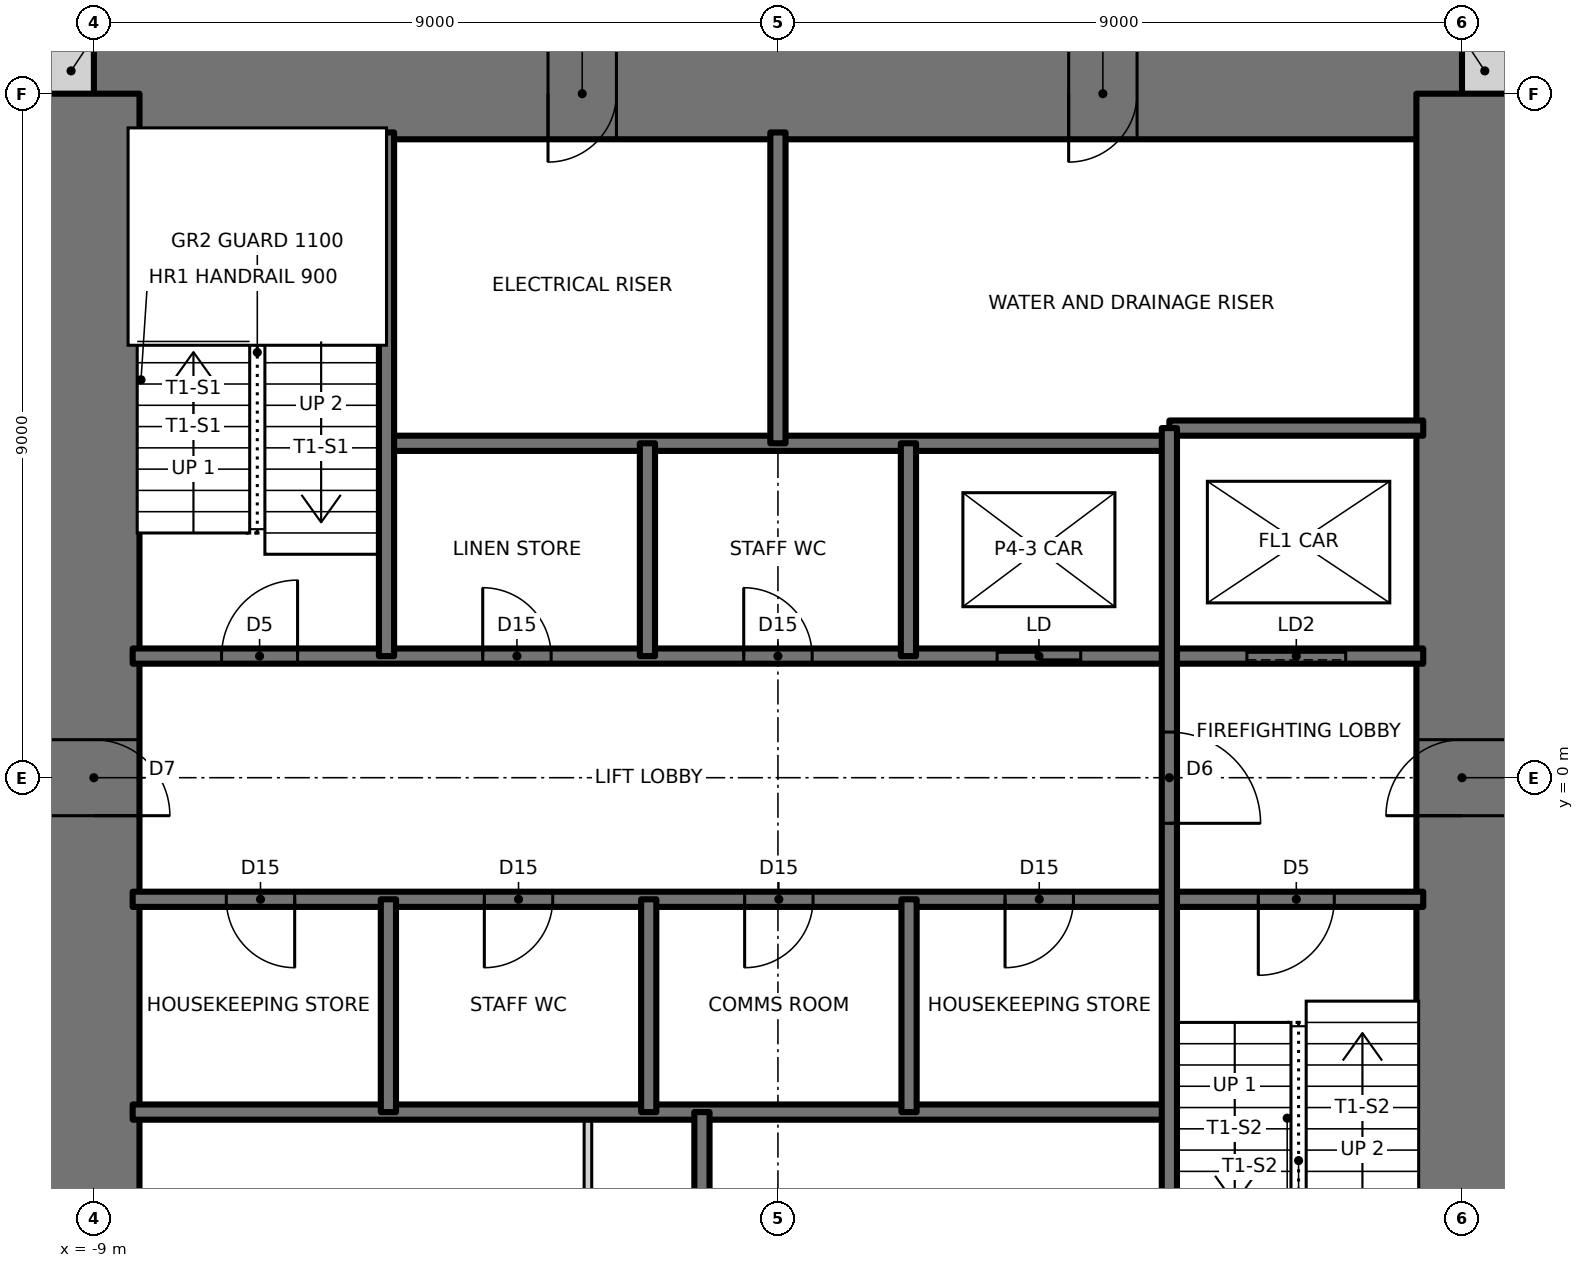
"""IFC4 building model, lengths in metres.
Left out: names, types, materials, properties, quantities, classifications, styles, units other than length and angle.
Written with IfcOpenShell. Run it as: python <this file> out.ifc"""

import sys

from ifc_helpers import new_model, si_unit, direction, frame, frame_2d, origin, place, context, subcontext, project, spatial, rectangle, extrude, element, fill, save


model = new_model("IFC4")
c1 = context("Model", 3, precision=1e-05, world=origin(), true_north=direction((0.0, 1.0)))
c2 = subcontext(c1, "Body", "Model", "MODEL_VIEW")
j1 = project(units=[si_unit("LENGTHUNIT", "METRE"), si_unit("PLANEANGLEUNIT", "RADIAN")], contexts=[c1])
p1 = place(None, origin())
s1 = spatial("IfcSite", under=j1, at=p1, CompositionType="ELEMENT")
p2 = place(p1, origin())
s2 = spatial("IfcBuilding", under=s1, at=p2, CompositionType="ELEMENT")
p3 = place(p2, frame((0.0, 0.0, 264.0)))
s3 = spatial("IfcBuildingStorey", under=s2, at=p3, CompositionType="ELEMENT", Elevation=264.0)
for number, where, z_axis, x_axis in (
    (1, (9.0, 9.3, 0.0), (0.0, 0.0, 1.0), (1.0, 0.0, 0.0)),
    (2, (-9.6, 9.3, 0.0), (0.0, 0.0, 1.0), (1.0, 0.0, 0.0)),
):
    element("IfcWall", number, at=place(p3, frame(where, z_axis=z_axis, x_axis=x_axis)), inside=s3, PredefinedType="SOLIDWALL", context=c2, shape_type="SweptSolid", body=[
        extrude(rectangle(XDim=0.6, YDim=0.6, at=frame_2d((0.3, 0.0))), origin(), (0.0, 0.0, 1.0), 3.5),
    ])
p4 = place(p3, frame((9.0, 9.0, 0.0), z_axis=(0.0, 0.0, 1.0), x_axis=(-1.0, 0.0, 0.0)))
e3 = element("IfcWall", 3, at=p4, inside=s3, PredefinedType="SHEAR", context=c2, shape_type="SweptSolid", body=[
    extrude(rectangle(XDim=18.0, YDim=1.2, at=frame_2d((9.0, 0.0))), origin(), (0.0, 0.0, 1.0), 3.5),
])
p5 = place(p4, frame((11.125, 0.0, 0.0)))
e4 = element("IfcOpeningElement", 4, at=p5, cuts=e3, PredefinedType="OPENING", context=c2, shape_type="SweptSolid", body=[
    extrude(rectangle(XDim=0.9, YDim=2.1, at=frame_2d((0.45, 1.05))), frame((0.0, 0.61, 0.0), z_axis=(0.0, -1.0, 0.0), x_axis=(1.0, 0.0, 0.0)), (0.0, 0.0, 1.0), 1.22),
])
p6 = place(p4, frame((4.275, 0.0, 0.0)))
e5 = element("IfcOpeningElement", 5, at=p6, cuts=e3, PredefinedType="OPENING", context=c2, shape_type="SweptSolid", body=[
    extrude(rectangle(XDim=0.9, YDim=2.1, at=frame_2d((0.45, 1.05))), frame((0.0, 0.61, 0.0), z_axis=(0.0, -1.0, 0.0), x_axis=(1.0, 0.0, 0.0)), (0.0, 0.0, 1.0), 1.22),
])
p7 = place(p3, frame((9.0, -9.0, 0.0), z_axis=(0.0, 0.0, 1.0), x_axis=(0.0, 1.0, 0.0)))
e6 = element("IfcWall", 6, at=p7, inside=s3, PredefinedType="SHEAR", context=c2, shape_type="SweptSolid", body=[
    extrude(rectangle(XDim=18.0, YDim=1.2, at=frame_2d((9.0, 0.0))), origin(), (0.0, 0.0, 1.0), 3.5),
])
p8 = place(p7, frame((8.5, 0.0, 0.0)))
e7 = element("IfcOpeningElement", 7, at=p8, cuts=e6, PredefinedType="OPENING", context=c2, shape_type="SweptSolid", body=[
    extrude(rectangle(XDim=1.0, YDim=2.1, at=frame_2d((0.5, 1.05))), frame((0.0, 0.61, 0.0), z_axis=(0.0, -1.0, 0.0), x_axis=(1.0, 0.0, 0.0)), (0.0, 0.0, 1.0), 1.22),
])
p9 = place(p3, frame((-9.0, 9.0, 0.0), z_axis=(0.0, 0.0, 1.0), x_axis=(0.0, -1.0, 0.0)))
e8 = element("IfcWall", 8, at=p9, inside=s3, PredefinedType="SHEAR", context=c2, shape_type="SweptSolid", body=[
    extrude(rectangle(XDim=18.0, YDim=1.2, at=frame_2d((9.0, 0.0))), origin(), (0.0, 0.0, 1.0), 3.5),
])
p10 = place(p9, frame((8.5, 0.0, 0.0)))
e9 = element("IfcOpeningElement", 9, at=p10, cuts=e8, PredefinedType="OPENING", context=c2, shape_type="SweptSolid", body=[
    extrude(rectangle(XDim=1.0, YDim=2.1, at=frame_2d((0.5, 1.05))), frame((0.0, 0.61, 0.0), z_axis=(0.0, -1.0, 0.0), x_axis=(1.0, 0.0, 0.0)), (0.0, 0.0, 1.0), 1.22),
])
p11 = place(p3, frame((-8.49, -4.4, 0.0), z_axis=(0.0, 0.0, 1.0), x_axis=(1.0, 0.0, 0.0)))
e10 = element("IfcWall", 10, at=p11, inside=s3, PredefinedType="SOLIDWALL", context=c2, shape_type="SweptSolid", body=[
    extrude(rectangle(XDim=13.64, YDim=0.2, at=frame_2d((6.82, 0.0))), origin(), (0.0, 0.0, 1.0), 3.5),
])
p12 = place(p3, frame((-8.49, -1.6, 0.0), z_axis=(0.0, 0.0, 1.0), x_axis=(1.0, 0.0, 0.0)))
e11 = element("IfcWall", 11, at=p12, inside=s3, PredefinedType="SOLIDWALL", context=c2, shape_type="SweptSolid", body=[
    extrude(rectangle(XDim=16.98, YDim=0.2, at=frame_2d((8.49, 0.0))), origin(), (0.0, 0.0, 1.0), 3.5),
])
p13 = place(p12, frame((14.81, 0.0, 0.0)))
e12 = element("IfcOpeningElement", 12, at=p13, cuts=e11, PredefinedType="OPENING", context=c2, shape_type="SweptSolid", body=[
    extrude(rectangle(XDim=1.0, YDim=2.1, at=frame_2d((0.5, 1.05))), frame((0.0, 0.11, 0.0), z_axis=(0.0, -1.0, 0.0), x_axis=(1.0, 0.0, 0.0)), (0.0, 0.0, 1.0), 0.22),
])
p14 = place(p12, frame((1.232, 0.0, 0.0)))
e13 = element("IfcOpeningElement", 13, at=p14, cuts=e11, PredefinedType="OPENING", context=c2, shape_type="SweptSolid", body=[
    extrude(rectangle(XDim=0.9, YDim=2.1, at=frame_2d((0.45, 1.05))), frame((0.0, 0.11, 0.0), z_axis=(0.0, -1.0, 0.0), x_axis=(1.0, 0.0, 0.0)), (0.0, 0.0, 1.0), 0.22),
])
p15 = place(p12, frame((4.627, 0.0, 0.0)))
e14 = element("IfcOpeningElement", 14, at=p15, cuts=e11, PredefinedType="OPENING", context=c2, shape_type="SweptSolid", body=[
    extrude(rectangle(XDim=0.9, YDim=2.1, at=frame_2d((0.45, 1.05))), frame((0.0, 0.11, 0.0), z_axis=(0.0, -1.0, 0.0), x_axis=(1.0, 0.0, 0.0)), (0.0, 0.0, 1.0), 0.22),
])
p16 = place(p12, frame((8.052, 0.0, 0.0)))
e15 = element("IfcOpeningElement", 15, at=p16, cuts=e11, PredefinedType="OPENING", context=c2, shape_type="SweptSolid", body=[
    extrude(rectangle(XDim=0.9, YDim=2.1, at=frame_2d((0.45, 1.05))), frame((0.0, 0.11, 0.0), z_axis=(0.0, -1.0, 0.0), x_axis=(1.0, 0.0, 0.0)), (0.0, 0.0, 1.0), 0.22),
])
p17 = place(p12, frame((11.478, 0.0, 0.0)))
e16 = element("IfcOpeningElement", 16, at=p17, cuts=e11, PredefinedType="OPENING", context=c2, shape_type="SweptSolid", body=[
    extrude(rectangle(XDim=0.9, YDim=2.1, at=frame_2d((0.45, 1.05))), frame((0.0, 0.11, 0.0), z_axis=(0.0, -1.0, 0.0), x_axis=(1.0, 0.0, 0.0)), (0.0, 0.0, 1.0), 0.22),
])
p18 = place(p3, frame((-8.49, 1.6, 0.0), z_axis=(0.0, 0.0, 1.0), x_axis=(1.0, 0.0, 0.0)))
e17 = element("IfcWall", 17, at=p18, inside=s3, PredefinedType="SOLIDWALL", context=c2, shape_type="SweptSolid", body=[
    extrude(rectangle(XDim=16.98, YDim=0.2, at=frame_2d((8.49, 0.0))), origin(), (0.0, 0.0, 1.0), 3.5),
])
p19 = place(p18, frame((1.17, 0.0, 0.0)))
e18 = element("IfcOpeningElement", 18, at=p19, cuts=e17, PredefinedType="OPENING", context=c2, shape_type="SweptSolid", body=[
    extrude(rectangle(XDim=1.0, YDim=2.1, at=frame_2d((0.5, 1.05))), frame((0.0, 0.11, 0.0), z_axis=(0.0, -1.0, 0.0), x_axis=(1.0, 0.0, 0.0)), (0.0, 0.0, 1.0), 0.22),
])
p20 = place(p18, frame((4.606, 0.0, 0.0)))
e19 = element("IfcOpeningElement", 19, at=p20, cuts=e17, PredefinedType="OPENING", context=c2, shape_type="SweptSolid", body=[
    extrude(rectangle(XDim=0.9, YDim=2.1, at=frame_2d((0.45, 1.05))), frame((0.0, 0.11, 0.0), z_axis=(0.0, -1.0, 0.0), x_axis=(1.0, 0.0, 0.0)), (0.0, 0.0, 1.0), 0.22),
])
p21 = place(p18, frame((8.04, 0.0, 0.0)))
e20 = element("IfcOpeningElement", 20, at=p21, cuts=e17, PredefinedType="OPENING", context=c2, shape_type="SweptSolid", body=[
    extrude(rectangle(XDim=0.9, YDim=2.1, at=frame_2d((0.45, 1.05))), frame((0.0, 0.11, 0.0), z_axis=(0.0, -1.0, 0.0), x_axis=(1.0, 0.0, 0.0)), (0.0, 0.0, 1.0), 0.22),
])
p22 = place(p18, frame((11.374, 0.0, 0.0)))
e21 = element("IfcOpeningElement", 21, at=p22, cuts=e17, PredefinedType="OPENING", context=c2, shape_type="SweptSolid", body=[
    extrude(rectangle(XDim=1.1, YDim=2.1, at=frame_2d((0.55, 1.05))), frame((0.0, 0.11, 0.0), z_axis=(0.0, -1.0, 0.0), x_axis=(1.0, 0.0, 0.0)), (0.0, 0.0, 1.0), 0.22),
])
p23 = place(p18, frame((14.66, 0.0, 0.0)))
e22 = element("IfcOpeningElement", 22, at=p23, cuts=e17, PredefinedType="OPENING", context=c2, shape_type="SweptSolid", body=[
    extrude(rectangle(XDim=1.3, YDim=2.1, at=frame_2d((0.65, 1.05))), frame((0.0, 0.11, 0.0), z_axis=(0.0, -1.0, 0.0), x_axis=(1.0, 0.0, 0.0)), (0.0, 0.0, 1.0), 0.22),
])
p24 = place(p3, frame((-5.15, 4.4, 0.0), z_axis=(0.0, 0.0, 1.0), x_axis=(1.0, 0.0, 0.0)))
e23 = element("IfcWall", 23, at=p24, inside=s3, PredefinedType="SOLIDWALL", context=c2, shape_type="SweptSolid", body=[
    extrude(rectangle(XDim=10.3, YDim=0.2, at=frame_2d((5.15, 0.0))), origin(), (0.0, 0.0, 1.0), 3.5),
])
p25 = place(p3, frame((5.15, 4.6, 0.0), z_axis=(0.0, 0.0, 1.0), x_axis=(1.0, 0.0, 0.0)))
e24 = element("IfcWall", 24, at=p25, inside=s3, PredefinedType="SOLIDWALL", context=c2, shape_type="SweptSolid", body=[
    extrude(rectangle(XDim=3.34, YDim=0.2, at=frame_2d((1.67, 0.0))), origin(), (0.0, 0.0, 1.0), 3.5),
])
p26 = place(p3, frame((5.15, -8.49, 0.0), z_axis=(0.0, 0.0, 1.0), x_axis=(0.0, 1.0, 0.0)))
e25 = element("IfcWall", 25, at=p26, inside=s3, PredefinedType="SOLIDWALL", context=c2, shape_type="SweptSolid", body=[
    extrude(rectangle(XDim=13.09, YDim=0.2, at=frame_2d((6.545, 0.0))), origin(), (0.0, 0.0, 1.0), 3.5),
])
p27 = place(p26, frame((7.89, 0.0, 0.0)))
e26 = element("IfcOpeningElement", 26, at=p27, cuts=e25, PredefinedType="OPENING", context=c2, shape_type="SweptSolid", body=[
    extrude(rectangle(XDim=1.2, YDim=2.1, at=frame_2d((0.6, 1.05))), frame((0.0, 0.11, 0.0), z_axis=(0.0, -1.0, 0.0), x_axis=(1.0, 0.0, 0.0)), (0.0, 0.0, 1.0), 0.22),
])
for number, where, z_axis, x_axis in (
    (27, (1.725, -4.4, 0.0), (0.0, 0.0, 1.0), (0.0, 1.0, 0.0)),
    (28, (1.717, 1.6, 0.0), (0.0, 0.0, 1.0), (0.0, 1.0, 0.0)),
):
    element("IfcWall", number, at=place(p3, frame(where, z_axis=z_axis, x_axis=x_axis)), inside=s3, PredefinedType="SOLIDWALL", context=c2, shape_type="SweptSolid", body=[
        extrude(rectangle(XDim=2.8, YDim=0.2, at=frame_2d((1.4, 0.0))), origin(), (0.0, 0.0, 1.0), 3.5),
    ])
for number, where, z_axis, x_axis in (
    (29, (0.0, 4.4, 0.0), (0.0, 0.0, 1.0), (0.0, 1.0, 0.0)),
    (30, (-1.0, -8.49, 0.0), (0.0, 0.0, 1.0), (0.0, 1.0, 0.0)),
):
    element("IfcWall", number, at=place(p3, frame(where, z_axis=z_axis, x_axis=x_axis)), inside=s3, PredefinedType="SOLIDWALL", context=c2, shape_type="SweptSolid", body=[
        extrude(rectangle(XDim=4.09, YDim=0.2, at=frame_2d((2.045, 0.0))), origin(), (0.0, 0.0, 1.0), 3.5),
    ])
for number, where, z_axis, x_axis in (
    (31, (-1.7, -4.4, 0.0), (0.0, 0.0, 1.0), (0.0, 1.0, 0.0)),
    (32, (-1.717, 1.6, 0.0), (0.0, 0.0, 1.0), (0.0, 1.0, 0.0)),
):
    element("IfcWall", number, at=place(p3, frame(where, z_axis=z_axis, x_axis=x_axis)), inside=s3, PredefinedType="SOLIDWALL", context=c2, shape_type="SweptSolid", body=[
        extrude(rectangle(XDim=2.8, YDim=0.2, at=frame_2d((1.4, 0.0))), origin(), (0.0, 0.0, 1.0), 3.5),
    ])
p28 = place(p3, frame((-2.5, -8.49, 0.0), z_axis=(0.0, 0.0, 1.0), x_axis=(0.0, 1.0, 0.0)))
e33 = element("IfcWall", 33, at=p28, inside=s3, PredefinedType="PARTITIONING", context=c2, shape_type="SweptSolid", body=[
    extrude(rectangle(XDim=4.09, YDim=0.1, at=frame_2d((2.045, 0.0))), origin(), (0.0, 0.0, 1.0), 3.3),
])
p29 = place(p28, frame((1.595, 0.0, 0.0)))
e34 = element("IfcOpeningElement", 34, at=p29, cuts=e33, PredefinedType="OPENING", context=c2, shape_type="SweptSolid", body=[
    extrude(rectangle(XDim=0.9, YDim=2.1, at=frame_2d((0.45, 1.05))), frame((0.0, 0.06, 0.0), z_axis=(0.0, -1.0, 0.0), x_axis=(1.0, 0.0, 0.0)), (0.0, 0.0, 1.0), 0.12),
])
p30 = place(p3, frame((-5.125, -4.4, 0.0), z_axis=(0.0, 0.0, 1.0), x_axis=(0.0, 1.0, 0.0)))
e35 = element("IfcWall", 35, at=p30, inside=s3, PredefinedType="SOLIDWALL", context=c2, shape_type="SweptSolid", body=[
    extrude(rectangle(XDim=2.8, YDim=0.2, at=frame_2d((1.4, 0.0))), origin(), (0.0, 0.0, 1.0), 3.5),
])
p31 = place(p3, frame((-5.15, 1.6, 0.0), z_axis=(0.0, 0.0, 1.0), x_axis=(0.0, 1.0, 0.0)))
e36 = element("IfcWall", 36, at=p31, inside=s3, PredefinedType="SOLIDWALL", context=c2, shape_type="SweptSolid", body=[
    extrude(rectangle(XDim=6.89, YDim=0.2, at=frame_2d((3.445, 0.0))), origin(), (0.0, 0.0, 1.0), 3.5),
])
p32 = place(p19, origin())
e37 = element("IfcDoor", 37, at=p32, inside=s3, OperationType="SINGLE_SWING_RIGHT", PredefinedType="DOOR", context=c2, shape_type="SweptSolid", body=[
    extrude(rectangle(XDim=1.0, YDim=2.1, at=frame_2d((0.5, 1.05))), frame((0.0, 0.025, 0.0), z_axis=(0.0, -1.0, 0.0), x_axis=(1.0, 0.0, 0.0)), (0.0, 0.0, 1.0), 0.05),
])
fill(e18, e37)
p33 = place(p13, frame((1.0, 0.0, 0.0), z_axis=(0.0, 0.0, 1.0), x_axis=(-1.0, 0.0, 0.0)))
e38 = element("IfcDoor", 38, at=p33, inside=s3, OperationType="SINGLE_SWING_RIGHT", PredefinedType="DOOR", context=c2, shape_type="SweptSolid", body=[
    extrude(rectangle(XDim=1.0, YDim=2.1, at=frame_2d((0.5, 1.05))), frame((0.0, 0.025, 0.0), z_axis=(0.0, -1.0, 0.0), x_axis=(1.0, 0.0, 0.0)), (0.0, 0.0, 1.0), 0.05),
])
fill(e12, e38)
p34 = place(p27, frame((1.2, 0.0, 0.0), z_axis=(0.0, 0.0, 1.0), x_axis=(-1.0, 0.0, 0.0)))
e39 = element("IfcDoor", 39, at=p34, inside=s3, OperationType="SINGLE_SWING_RIGHT", PredefinedType="DOOR", context=c2, shape_type="SweptSolid", body=[
    extrude(rectangle(XDim=1.2, YDim=2.1, at=frame_2d((0.6, 1.05))), frame((0.0, 0.025, 0.0), z_axis=(0.0, -1.0, 0.0), x_axis=(1.0, 0.0, 0.0)), (0.0, 0.0, 1.0), 0.05),
])
fill(e26, e39)
p35 = place(p20, origin())
e40 = element("IfcDoor", 40, at=p35, inside=s3, OperationType="SINGLE_SWING_LEFT", PredefinedType="DOOR", context=c2, shape_type="SweptSolid", body=[
    extrude(rectangle(XDim=0.9, YDim=2.1, at=frame_2d((0.45, 1.05))), frame((0.0, 0.025, 0.0), z_axis=(0.0, -1.0, 0.0), x_axis=(1.0, 0.0, 0.0)), (0.0, 0.0, 1.0), 0.05),
])
fill(e19, e40)
p36 = place(p21, origin())
e41 = element("IfcDoor", 41, at=p36, inside=s3, OperationType="SINGLE_SWING_LEFT", PredefinedType="DOOR", context=c2, shape_type="SweptSolid", body=[
    extrude(rectangle(XDim=0.9, YDim=2.1, at=frame_2d((0.45, 1.05))), frame((0.0, 0.025, 0.0), z_axis=(0.0, -1.0, 0.0), x_axis=(1.0, 0.0, 0.0)), (0.0, 0.0, 1.0), 0.05),
])
fill(e20, e41)
p37 = place(p14, frame((0.9, 0.0, 0.0), z_axis=(0.0, 0.0, 1.0), x_axis=(-1.0, 0.0, 0.0)))
e42 = element("IfcDoor", 42, at=p37, inside=s3, OperationType="SINGLE_SWING_LEFT", PredefinedType="DOOR", context=c2, shape_type="SweptSolid", body=[
    extrude(rectangle(XDim=0.9, YDim=2.1, at=frame_2d((0.45, 1.05))), frame((0.0, 0.025, 0.0), z_axis=(0.0, -1.0, 0.0), x_axis=(1.0, 0.0, 0.0)), (0.0, 0.0, 1.0), 0.05),
])
fill(e13, e42)
p38 = place(p15, frame((0.9, 0.0, 0.0), z_axis=(0.0, 0.0, 1.0), x_axis=(-1.0, 0.0, 0.0)))
e43 = element("IfcDoor", 43, at=p38, inside=s3, OperationType="SINGLE_SWING_RIGHT", PredefinedType="DOOR", context=c2, shape_type="SweptSolid", body=[
    extrude(rectangle(XDim=0.9, YDim=2.1, at=frame_2d((0.45, 1.05))), frame((0.0, 0.025, 0.0), z_axis=(0.0, -1.0, 0.0), x_axis=(1.0, 0.0, 0.0)), (0.0, 0.0, 1.0), 0.05),
])
fill(e14, e43)
p39 = place(p16, frame((0.9, 0.0, 0.0), z_axis=(0.0, 0.0, 1.0), x_axis=(-1.0, 0.0, 0.0)))
e44 = element("IfcDoor", 44, at=p39, inside=s3, OperationType="SINGLE_SWING_RIGHT", PredefinedType="DOOR", context=c2, shape_type="SweptSolid", body=[
    extrude(rectangle(XDim=0.9, YDim=2.1, at=frame_2d((0.45, 1.05))), frame((0.0, 0.025, 0.0), z_axis=(0.0, -1.0, 0.0), x_axis=(1.0, 0.0, 0.0)), (0.0, 0.0, 1.0), 0.05),
])
fill(e15, e44)
p40 = place(p17, frame((0.9, 0.0, 0.0), z_axis=(0.0, 0.0, 1.0), x_axis=(-1.0, 0.0, 0.0)))
e45 = element("IfcDoor", 45, at=p40, inside=s3, OperationType="SINGLE_SWING_RIGHT", PredefinedType="DOOR", context=c2, shape_type="SweptSolid", body=[
    extrude(rectangle(XDim=0.9, YDim=2.1, at=frame_2d((0.45, 1.05))), frame((0.0, 0.025, 0.0), z_axis=(0.0, -1.0, 0.0), x_axis=(1.0, 0.0, 0.0)), (0.0, 0.0, 1.0), 0.05),
])
fill(e16, e45)
p41 = place(p10, origin())
e46 = element("IfcDoor", 46, at=p41, inside=s3, OperationType="SINGLE_SWING_RIGHT", PredefinedType="DOOR", context=c2, shape_type="SweptSolid", body=[
    extrude(rectangle(XDim=1.0, YDim=2.1, at=frame_2d((0.5, 1.05))), frame((0.0, 0.025, 0.0), z_axis=(0.0, -1.0, 0.0), x_axis=(1.0, 0.0, 0.0)), (0.0, 0.0, 1.0), 0.05),
])
fill(e9, e46)
p42 = place(p8, origin())
e47 = element("IfcDoor", 47, at=p42, inside=s3, OperationType="SINGLE_SWING_LEFT", PredefinedType="DOOR", context=c2, shape_type="SweptSolid", body=[
    extrude(rectangle(XDim=1.0, YDim=2.1, at=frame_2d((0.5, 1.05))), frame((0.0, 0.025, 0.0), z_axis=(0.0, -1.0, 0.0), x_axis=(1.0, 0.0, 0.0)), (0.0, 0.0, 1.0), 0.05),
])
fill(e7, e47)
p43 = place(p5, origin())
e48 = element("IfcDoor", 48, at=p43, inside=s3, OperationType="SINGLE_SWING_RIGHT", PredefinedType="DOOR", context=c2, shape_type="SweptSolid", body=[
    extrude(rectangle(XDim=0.9, YDim=2.1, at=frame_2d((0.45, 1.05))), frame((0.0, 0.025, 0.0), z_axis=(0.0, -1.0, 0.0), x_axis=(1.0, 0.0, 0.0)), (0.0, 0.0, 1.0), 0.05),
])
fill(e4, e48)
p44 = place(p6, origin())
e49 = element("IfcDoor", 49, at=p44, inside=s3, OperationType="SINGLE_SWING_RIGHT", PredefinedType="DOOR", context=c2, shape_type="SweptSolid", body=[
    extrude(rectangle(XDim=0.9, YDim=2.1, at=frame_2d((0.45, 1.05))), frame((0.0, 0.025, 0.0), z_axis=(0.0, -1.0, 0.0), x_axis=(1.0, 0.0, 0.0)), (0.0, 0.0, 1.0), 0.05),
])
fill(e5, e49)
p45 = place(p22, origin())
e50 = element("IfcDoor", 50, at=p45, inside=s3, OperationType="DOUBLE_DOOR_SLIDING", PredefinedType="DOOR", context=c2, shape_type="SweptSolid", body=[
    extrude(rectangle(XDim=1.1, YDim=2.1, at=frame_2d((0.55, 1.05))), frame((0.0, 0.025, 0.0), z_axis=(0.0, -1.0, 0.0), x_axis=(1.0, 0.0, 0.0)), (0.0, 0.0, 1.0), 0.05),
])
fill(e21, e50)
p46 = place(p23, origin())
e51 = element("IfcDoor", 51, at=p46, inside=s3, OperationType="SLIDING_TO_LEFT", PredefinedType="DOOR", context=c2, shape_type="SweptSolid", body=[
    extrude(rectangle(XDim=1.3, YDim=2.1, at=frame_2d((0.65, 1.05))), frame((0.0, 0.025, 0.0), z_axis=(0.0, -1.0, 0.0), x_axis=(1.0, 0.0, 0.0)), (0.0, 0.0, 1.0), 0.05),
])
fill(e22, e51)
save(model, sys.argv[1])
